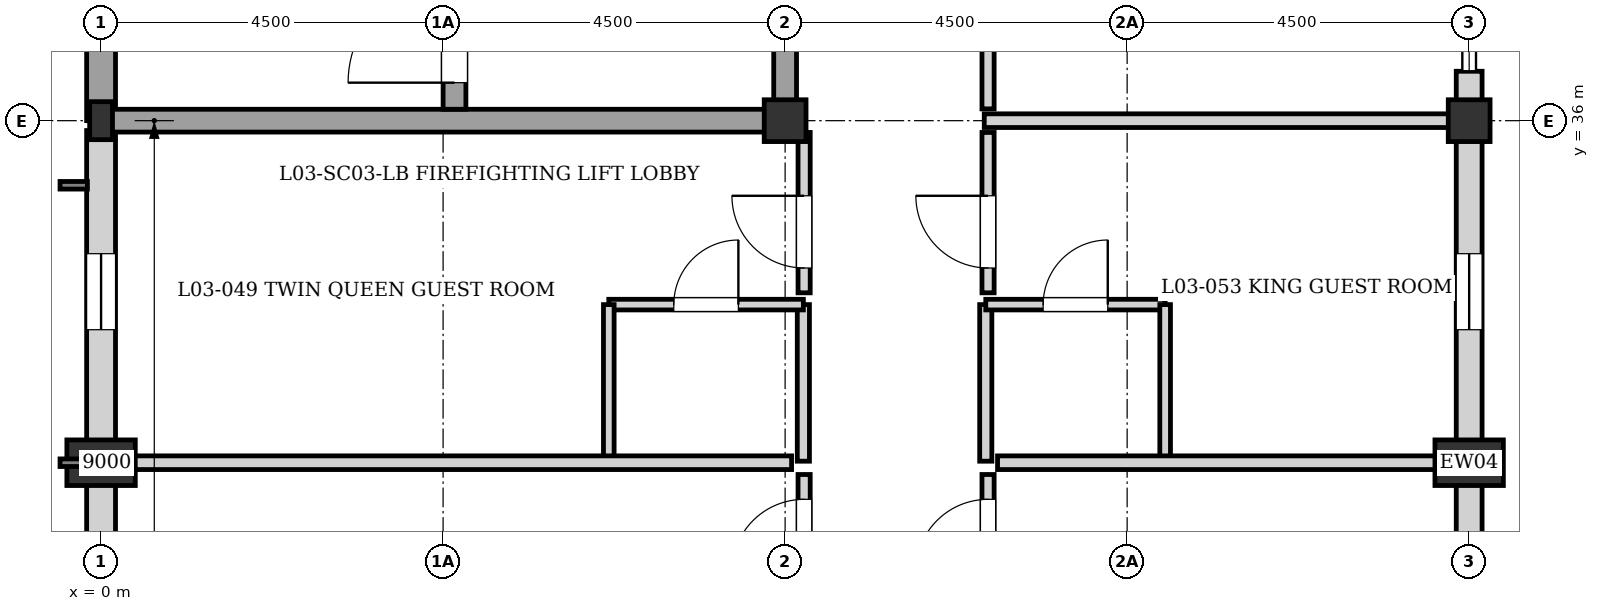
"""IFC4 building model, lengths in metres.
Left out: names, types, materials, properties, quantities, classifications, styles, units other than length and angle.
Written with IfcOpenShell. Run it as: python <this file> out.ifc"""

import sys

from ifc_helpers import new_model, si_unit, direction, frame, frame_2d, origin, origin_2d, place, context, subcontext, project, spatial, rectangle, i_section, extrude, element, fill, save


model = new_model("IFC4")
c1 = context("Model", 3, precision=1e-05, world=origin(), true_north=direction((0.0, 1.0)))
c2 = subcontext(c1, "Body", "Model", "MODEL_VIEW")
j1 = project(units=[si_unit("LENGTHUNIT", "METRE"), si_unit("PLANEANGLEUNIT", "RADIAN")], contexts=[c1])
p1 = place(None, origin())
s1 = spatial("IfcSite", under=j1, at=p1, CompositionType="ELEMENT")
p2 = place(p1, origin())
s2 = spatial("IfcBuilding", under=s1, at=p2, CompositionType="ELEMENT")
p3 = place(p2, frame((0.0, 0.0, 11.52)))
s3 = spatial("IfcBuildingStorey", under=s2, at=p3, CompositionType="ELEMENT", Elevation=11.52)
p4 = place(p3, frame((0.0, 36.0, 0.0), z_axis=(0.0, 0.0, 1.0), x_axis=(1.0, 0.0, 0.0)))
e1 = element("IfcColumn", 1, at=p4, inside=s3, PredefinedType="COLUMN", context=c2, shape_type="SweptSolid", body=[
    extrude(i_section(OverallWidth=0.3, OverallDepth=0.5, WebThickness=0.014, FlangeThickness=0.028, at=origin_2d()), origin(), (0.0, 0.0, 1.0), 3.04),
])
for number, where, z_axis, x_axis in (
    (2, (9.0, 36.0, 0.0), (0.0, 0.0, 1.0), (1.0, 0.0, 0.0)),
    (3, (18.0, 36.0, 0.0), (0.0, 0.0, 1.0), (1.0, 0.0, 0.0)),
):
    element("IfcColumn", number, at=place(p3, frame(where, z_axis=z_axis, x_axis=x_axis)), inside=s3, PredefinedType="COLUMN", context=c2, shape_type="SweptSolid", body=[
        extrude(rectangle(XDim=0.55, YDim=0.55, at=origin_2d()), origin(), (0.0, 0.0, 1.0), 3.04),
    ])
for number, where, z_axis, x_axis in (
    (4, (0.0, 31.5, 0.0), (0.0, 0.0, 1.0), (0.0, 1.0, 0.0)),
    (5, (18.0, 31.5, 0.0), (0.0, 0.0, 1.0), (0.0, 1.0, 0.0)),
):
    element("IfcColumn", number, at=place(p3, frame(where, z_axis=z_axis, x_axis=x_axis)), inside=s3, PredefinedType="PILASTER", context=c2, shape_type="SweptSolid", body=[
        extrude(rectangle(XDim=0.6, YDim=0.9, at=origin_2d()), origin(), (0.0, 0.0, 1.0), 3.04),
    ])
p5 = place(p3, frame((0.0, 27.0, 0.0), z_axis=(0.0, 0.0, 1.0), x_axis=(0.0, 1.0, 0.0)))
e6 = element("IfcWall", 6, at=p5, inside=s3, PredefinedType="SOLIDWALL", context=c2, shape_type="SweptSolid", body=[
    extrude(rectangle(XDim=8.87, YDim=0.38, at=frame_2d((4.435, 0.0))), origin(), (0.0, 0.0, 1.0), 2.48),
])
p6 = place(p5, frame((1.75, 0.0, 0.35)))
e7 = element("IfcOpeningElement", 7, at=p6, cuts=e6, PredefinedType="OPENING", context=c2, shape_type="SweptSolid", body=[
    extrude(rectangle(XDim=1.0, YDim=1.6, at=frame_2d((0.5, 0.8))), frame((0.0, 0.2, 0.0), z_axis=(0.0, -1.0, 0.0), x_axis=(1.0, 0.0, 0.0)), (0.0, 0.0, 1.0), 0.4),
])
p7 = place(p5, frame((6.25, 0.0, 0.35)))
e8 = element("IfcOpeningElement", 8, at=p7, cuts=e6, PredefinedType="OPENING", context=c2, shape_type="SweptSolid", body=[
    extrude(rectangle(XDim=1.0, YDim=1.6, at=frame_2d((0.5, 0.8))), frame((0.0, 0.2, 0.0), z_axis=(0.0, -1.0, 0.0), x_axis=(1.0, 0.0, 0.0)), (0.0, 0.0, 1.0), 0.4),
])
p8 = place(p3, frame((0.0, 36.0, 0.0), z_axis=(0.0, 0.0, 1.0), x_axis=(0.0, 1.0, 0.0)))
e9 = element("IfcWall", 9, at=p8, inside=s3, PredefinedType="SOLIDWALL", context=c2, shape_type="SweptSolid", body=[
    extrude(rectangle(XDim=9.0, YDim=0.38, at=frame_2d((4.5, 0.0))), origin(), (0.0, 0.0, 1.0), 2.82),
])
p9 = place(p3, frame((18.0, 36.65, 0.0), z_axis=(0.0, 0.0, 1.0), x_axis=(0.0, -1.0, 0.0)))
e10 = element("IfcWall", 10, at=p9, inside=s3, PredefinedType="SOLIDWALL", context=c2, shape_type="SweptSolid", body=[
    extrude(rectangle(XDim=0.65, YDim=0.34, at=frame_2d((0.325, 0.0))), origin(), (0.0, 0.0, 1.0), 2.42),
])
p10 = place(p3, frame((18.0, 36.0, 0.0), z_axis=(0.0, 0.0, 1.0), x_axis=(0.0, -1.0, 0.0)))
e11 = element("IfcWall", 11, at=p10, inside=s3, PredefinedType="SOLIDWALL", context=c2, shape_type="SweptSolid", body=[
    extrude(rectangle(XDim=9.0, YDim=0.34, at=frame_2d((4.5, 0.0))), origin(), (0.0, 0.0, 1.0), 2.48),
])
p11 = place(p10, frame((1.75, 0.0, 0.35)))
e12 = element("IfcOpeningElement", 12, at=p11, cuts=e11, PredefinedType="OPENING", context=c2, shape_type="SweptSolid", body=[
    extrude(rectangle(XDim=1.0, YDim=1.6, at=frame_2d((0.5, 0.8))), frame((0.0, 0.18, 0.0), z_axis=(0.0, -1.0, 0.0), x_axis=(1.0, 0.0, 0.0)), (0.0, 0.0, 1.0), 0.36),
])
p12 = place(p10, frame((6.25, 0.0, 0.35)))
e13 = element("IfcOpeningElement", 13, at=p12, cuts=e11, PredefinedType="OPENING", context=c2, shape_type="SweptSolid", body=[
    extrude(rectangle(XDim=1.0, YDim=1.6, at=frame_2d((0.5, 0.8))), frame((0.0, 0.18, 0.0), z_axis=(0.0, -1.0, 0.0), x_axis=(1.0, 0.0, 0.0)), (0.0, 0.0, 1.0), 0.36),
])
p13 = place(p3, frame((0.0, 36.0, 0.0), z_axis=(0.0, 0.0, 1.0), x_axis=(1.0, 0.0, 0.0)))
e14 = element("IfcWall", 14, at=p13, inside=s3, PredefinedType="SHEAR", context=c2, shape_type="SweptSolid", body=[
    extrude(rectangle(XDim=9.0, YDim=0.3, at=frame_2d((4.5, 0.0))), origin(), (0.0, 0.0, 1.0), 2.82),
])
p14 = place(p3, frame((9.0, 36.0, 0.0), z_axis=(0.0, 0.0, 1.0), x_axis=(0.0, 1.0, 0.0)))
e15 = element("IfcWall", 15, at=p14, inside=s3, PredefinedType="SHEAR", context=c2, shape_type="SweptSolid", body=[
    extrude(rectangle(XDim=9.0, YDim=0.3, at=frame_2d((4.5, 0.0))), origin(), (0.0, 0.0, 1.0), 2.82),
])
p15 = place(p14, frame((2.05, 0.0, 0.0)))
e16 = element("IfcOpeningElement", 16, at=p15, cuts=e15, PredefinedType="OPENING", context=c2, shape_type="SweptSolid", body=[
    extrude(rectangle(XDim=1.4, YDim=2.02, at=frame_2d((0.7, 1.01))), frame((0.0, 0.16, 0.0), z_axis=(0.0, -1.0, 0.0), x_axis=(1.0, 0.0, 0.0)), (0.0, 0.0, 1.0), 0.32),
])
p16 = place(p3, frame((4.65, 36.15, 0.0), z_axis=(0.0, 0.0, 1.0), x_axis=(0.0, 1.0, 0.0)))
e17 = element("IfcWall", 17, at=p16, inside=s3, PredefinedType="SHEAR", context=c2, shape_type="SweptSolid", body=[
    extrude(rectangle(XDim=8.7, YDim=0.3, at=frame_2d((4.35, 0.0))), origin(), (0.0, 0.0, 1.0), 2.82),
])
p17 = place(p16, frame((0.35, 0.0, 0.0)))
e18 = element("IfcOpeningElement", 18, at=p17, cuts=e17, PredefinedType="OPENING", context=c2, shape_type="SweptSolid", body=[
    extrude(rectangle(XDim=1.4, YDim=2.02, at=frame_2d((0.7, 1.01))), frame((0.0, 0.16, 0.0), z_axis=(0.0, -1.0, 0.0), x_axis=(1.0, 0.0, 0.0)), (0.0, 0.0, 1.0), 0.32),
])
p18 = place(p3, frame((9.24, 31.52, 0.0), z_axis=(0.0, 0.0, 1.0), x_axis=(0.0, 1.0, 0.0)))
e19 = element("IfcWall", 19, at=p18, inside=s3, PredefinedType="PARTITIONING", context=c2, shape_type="SweptSolid", body=[
    extrude(rectangle(XDim=2.06, YDim=0.16, at=frame_2d((1.03, 0.0))), origin(), (0.0, 0.0, 1.0), 2.82),
])
p19 = place(p3, frame((6.68, 33.58, 0.0), z_axis=(0.0, 0.0, 1.0), x_axis=(1.0, 0.0, 0.0)))
e20 = element("IfcWall", 20, at=p19, inside=s3, PredefinedType="PLUMBINGWALL", context=c2, shape_type="SweptSolid", body=[
    extrude(rectangle(XDim=2.56, YDim=0.14, at=frame_2d((1.28, 0.0))), origin(), (0.0, 0.0, 1.0), 2.82),
])
p20 = place(p19, frame((0.855, 0.0, 0.0)))
e21 = element("IfcOpeningElement", 21, at=p20, cuts=e20, PredefinedType="OPENING", context=c2, shape_type="SweptSolid", body=[
    extrude(rectangle(XDim=0.85, YDim=2.04, at=frame_2d((0.425, 1.02))), frame((0.0, 0.08, 0.0), z_axis=(0.0, -1.0, 0.0), x_axis=(1.0, 0.0, 0.0)), (0.0, 0.0, 1.0), 0.16),
])
p21 = place(p3, frame((6.68, 31.52, 0.0), z_axis=(0.0, 0.0, 1.0), x_axis=(0.0, 1.0, 0.0)))
e22 = element("IfcWall", 22, at=p21, inside=s3, PredefinedType="PLUMBINGWALL", context=c2, shape_type="SweptSolid", body=[
    extrude(rectangle(XDim=2.06, YDim=0.14, at=frame_2d((1.03, 0.0))), origin(), (0.0, 0.0, 1.0), 2.82),
])
p22 = place(p3, frame((11.64, 31.52, 0.0), z_axis=(0.0, 0.0, 1.0), x_axis=(0.0, 1.0, 0.0)))
e23 = element("IfcWall", 23, at=p22, inside=s3, PredefinedType="PARTITIONING", context=c2, shape_type="SweptSolid", body=[
    extrude(rectangle(XDim=2.06, YDim=0.16, at=frame_2d((1.03, 0.0))), origin(), (0.0, 0.0, 1.0), 2.82),
])
p23 = place(p3, frame((11.64, 33.58, 0.0), z_axis=(0.0, 0.0, 1.0), x_axis=(1.0, 0.0, 0.0)))
e24 = element("IfcWall", 24, at=p23, inside=s3, PredefinedType="PLUMBINGWALL", context=c2, shape_type="SweptSolid", body=[
    extrude(rectangle(XDim=2.36, YDim=0.14, at=frame_2d((1.18, 0.0))), origin(), (0.0, 0.0, 1.0), 2.82),
])
p24 = place(p23, frame((0.755, 0.0, 0.0)))
e25 = element("IfcOpeningElement", 25, at=p24, cuts=e24, PredefinedType="OPENING", context=c2, shape_type="SweptSolid", body=[
    extrude(rectangle(XDim=0.85, YDim=2.04, at=frame_2d((0.425, 1.02))), frame((0.0, 0.08, 0.0), z_axis=(0.0, -1.0, 0.0), x_axis=(1.0, 0.0, 0.0)), (0.0, 0.0, 1.0), 0.16),
])
p25 = place(p3, frame((14.0, 31.52, 0.0), z_axis=(0.0, 0.0, 1.0), x_axis=(0.0, 1.0, 0.0)))
e26 = element("IfcWall", 26, at=p25, inside=s3, PredefinedType="PLUMBINGWALL", context=c2, shape_type="SweptSolid", body=[
    extrude(rectangle(XDim=2.06, YDim=0.14, at=frame_2d((1.03, 0.0))), origin(), (0.0, 0.0, 1.0), 2.82),
])
p26 = place(p3, frame((0.195, 31.5, 0.0), z_axis=(0.0, 0.0, 1.0), x_axis=(1.0, 0.0, 0.0)))
e27 = element("IfcWall", 27, at=p26, inside=s3, PredefinedType="PARTITIONING", context=c2, shape_type="SweptSolid", body=[
    extrude(rectangle(XDim=8.89, YDim=0.18, at=frame_2d((4.445, 0.0))), origin(), (0.0, 0.0, 1.0), 2.82),
])
p27 = place(p3, frame((11.795, 31.5, 0.0), z_axis=(0.0, 0.0, 1.0), x_axis=(1.0, 0.0, 0.0)))
e28 = element("IfcWall", 28, at=p27, inside=s3, PredefinedType="PARTITIONING", context=c2, shape_type="SweptSolid", body=[
    extrude(rectangle(XDim=6.03, YDim=0.18, at=frame_2d((3.015, 0.0))), origin(), (0.0, 0.0, 1.0), 2.82),
])
p28 = place(p3, frame((11.62, 36.0, 0.0), z_axis=(0.0, 0.0, 1.0), x_axis=(1.0, 0.0, 0.0)))
e29 = element("IfcWall", 29, at=p28, inside=s3, PredefinedType="PARTITIONING", context=c2, shape_type="SweptSolid", body=[
    extrude(rectangle(XDim=6.205, YDim=0.18, at=frame_2d((3.103, 0.0))), origin(), (0.0, 0.0, 1.0), 2.34),
])
p29 = place(p3, frame((9.25, 29.235, 0.0), z_axis=(0.0, 0.0, 1.0), x_axis=(0.0, 1.0, 0.0)))
e30 = element("IfcWall", 30, at=p29, inside=s3, PredefinedType="PARTITIONING", context=c2, shape_type="SweptSolid", body=[
    extrude(rectangle(XDim=2.11, YDim=0.16, at=frame_2d((1.055, 0.0))), origin(), (0.0, 0.0, 1.0), 2.82),
])
p30 = place(p29, frame((0.833, 0.0, 0.0)))
e31 = element("IfcOpeningElement", 31, at=p30, cuts=e30, PredefinedType="OPENING", context=c2, shape_type="SweptSolid", body=[
    extrude(rectangle(XDim=0.95, YDim=2.15, at=frame_2d((0.475, 1.075))), frame((0.0, 0.09, 0.0), z_axis=(0.0, -1.0, 0.0), x_axis=(1.0, 0.0, 0.0)), (0.0, 0.0, 1.0), 0.18),
])
p31 = place(p3, frame((9.25, 33.735, 0.0), z_axis=(0.0, 0.0, 1.0), x_axis=(0.0, 1.0, 0.0)))
e32 = element("IfcWall", 32, at=p31, inside=s3, PredefinedType="PARTITIONING", context=c2, shape_type="SweptSolid", body=[
    extrude(rectangle(XDim=2.11, YDim=0.16, at=frame_2d((1.055, 0.0))), origin(), (0.0, 0.0, 1.0), 2.82),
])
p32 = place(p31, frame((0.327, 0.0, 0.0)))
e33 = element("IfcOpeningElement", 33, at=p32, cuts=e32, PredefinedType="OPENING", context=c2, shape_type="SweptSolid", body=[
    extrude(rectangle(XDim=0.95, YDim=2.15, at=frame_2d((0.475, 1.075))), frame((0.0, 0.09, 0.0), z_axis=(0.0, -1.0, 0.0), x_axis=(1.0, 0.0, 0.0)), (0.0, 0.0, 1.0), 0.18),
])
p33 = place(p3, frame((11.67, 29.235, 0.0), z_axis=(0.0, 0.0, 1.0), x_axis=(0.0, 1.0, 0.0)))
e34 = element("IfcWall", 34, at=p33, inside=s3, PredefinedType="PARTITIONING", context=c2, shape_type="SweptSolid", body=[
    extrude(rectangle(XDim=2.11, YDim=0.16, at=frame_2d((1.055, 0.0))), origin(), (0.0, 0.0, 1.0), 2.82),
])
p34 = place(p33, frame((0.833, 0.0, 0.0)))
e35 = element("IfcOpeningElement", 35, at=p34, cuts=e34, PredefinedType="OPENING", context=c2, shape_type="SweptSolid", body=[
    extrude(rectangle(XDim=0.95, YDim=2.15, at=frame_2d((0.475, 1.075))), frame((0.0, 0.09, 0.0), z_axis=(0.0, -1.0, 0.0), x_axis=(1.0, 0.0, 0.0)), (0.0, 0.0, 1.0), 0.18),
])
p35 = place(p3, frame((11.67, 33.735, 0.0), z_axis=(0.0, 0.0, 1.0), x_axis=(0.0, 1.0, 0.0)))
e36 = element("IfcWall", 36, at=p35, inside=s3, PredefinedType="PARTITIONING", context=c2, shape_type="SweptSolid", body=[
    extrude(rectangle(XDim=2.11, YDim=0.16, at=frame_2d((1.055, 0.0))), origin(), (0.0, 0.0, 1.0), 2.82),
])
p36 = place(p35, frame((0.327, 0.0, 0.0)))
e37 = element("IfcOpeningElement", 37, at=p36, cuts=e36, PredefinedType="OPENING", context=c2, shape_type="SweptSolid", body=[
    extrude(rectangle(XDim=0.95, YDim=2.15, at=frame_2d((0.475, 1.075))), frame((0.0, 0.09, 0.0), z_axis=(0.0, -1.0, 0.0), x_axis=(1.0, 0.0, 0.0)), (0.0, 0.0, 1.0), 0.18),
])
p37 = place(p3, frame((11.67, 36.155, 0.0), z_axis=(0.0, 0.0, 1.0), x_axis=(0.0, 1.0, 0.0)))
e38 = element("IfcWall", 38, at=p37, inside=s3, PredefinedType="PARTITIONING", context=c2, shape_type="SweptSolid", body=[
    extrude(rectangle(XDim=4.125, YDim=0.16, at=frame_2d((2.062, 0.0))), origin(), (0.0, 0.0, 1.0), 2.82),
])
p38 = place(p37, frame((2.058, 0.0, 0.0)))
e39 = element("IfcOpeningElement", 39, at=p38, cuts=e38, PredefinedType="OPENING", context=c2, shape_type="SweptSolid", body=[
    extrude(rectangle(XDim=1.0, YDim=2.1, at=frame_2d((0.5, 1.05))), frame((0.0, 0.09, 0.0), z_axis=(0.0, -1.0, 0.0), x_axis=(1.0, 0.0, 0.0)), (0.0, 0.0, 1.0), 0.18),
])
p39 = place(p7, origin())
e40 = element("IfcWindow", 40, at=p39, inside=s3, PartitioningType="SINGLE_PANEL", PredefinedType="WINDOW", context=c2, shape_type="SweptSolid", body=[
    extrude(rectangle(XDim=1.0, YDim=1.6, at=frame_2d((0.5, 0.8))), frame((0.0, 0.03, 0.0), z_axis=(0.0, -1.0, 0.0), x_axis=(1.0, 0.0, 0.0)), (0.0, 0.0, 1.0), 0.06),
])
fill(e8, e40)
p40 = place(p11, origin())
e41 = element("IfcWindow", 41, at=p40, inside=s3, PartitioningType="SINGLE_PANEL", PredefinedType="WINDOW", context=c2, shape_type="SweptSolid", body=[
    extrude(rectangle(XDim=1.0, YDim=1.6, at=frame_2d((0.5, 0.8))), frame((0.0, 0.03, 0.0), z_axis=(0.0, -1.0, 0.0), x_axis=(1.0, 0.0, 0.0)), (0.0, 0.0, 1.0), 0.06),
])
fill(e12, e41)
p41 = place(p17, origin())
e42 = element("IfcDoor", 42, at=p41, inside=s3, OperationType="SINGLE_SWING_LEFT", PredefinedType="DOOR", context=c2, shape_type="SweptSolid", body=[
    extrude(rectangle(XDim=1.4, YDim=2.02, at=frame_2d((0.7, 1.01))), frame((0.0, 0.025, 0.0), z_axis=(0.0, -1.0, 0.0), x_axis=(1.0, 0.0, 0.0)), (0.0, 0.0, 1.0), 0.05),
])
fill(e18, e42)
p42 = place(p20, origin())
e43 = element("IfcDoor", 43, at=p42, inside=s3, OperationType="SINGLE_SWING_RIGHT", PredefinedType="DOOR", context=c2, shape_type="SweptSolid", body=[
    extrude(rectangle(XDim=0.85, YDim=2.04, at=frame_2d((0.425, 1.02))), frame((0.0, 0.025, 0.0), z_axis=(0.0, -1.0, 0.0), x_axis=(1.0, 0.0, 0.0)), (0.0, 0.0, 1.0), 0.05),
])
fill(e21, e43)
p43 = place(p24, origin())
e44 = element("IfcDoor", 44, at=p43, inside=s3, OperationType="SINGLE_SWING_RIGHT", PredefinedType="DOOR", context=c2, shape_type="SweptSolid", body=[
    extrude(rectangle(XDim=0.85, YDim=2.04, at=frame_2d((0.425, 1.02))), frame((0.0, 0.025, 0.0), z_axis=(0.0, -1.0, 0.0), x_axis=(1.0, 0.0, 0.0)), (0.0, 0.0, 1.0), 0.05),
])
fill(e25, e44)
p44 = place(p30, origin())
e45 = element("IfcDoor", 45, at=p44, inside=s3, OperationType="SINGLE_SWING_LEFT", PredefinedType="DOOR", context=c2, shape_type="SweptSolid", body=[
    extrude(rectangle(XDim=0.95, YDim=2.15, at=frame_2d((0.475, 1.075))), frame((0.0, 0.025, 0.0), z_axis=(0.0, -1.0, 0.0), x_axis=(1.0, 0.0, 0.0)), (0.0, 0.0, 1.0), 0.05),
])
fill(e31, e45)
p45 = place(p32, origin())
e46 = element("IfcDoor", 46, at=p45, inside=s3, OperationType="SINGLE_SWING_RIGHT", PredefinedType="DOOR", context=c2, shape_type="SweptSolid", body=[
    extrude(rectangle(XDim=0.95, YDim=2.15, at=frame_2d((0.475, 1.075))), frame((0.0, 0.025, 0.0), z_axis=(0.0, -1.0, 0.0), x_axis=(1.0, 0.0, 0.0)), (0.0, 0.0, 1.0), 0.05),
])
fill(e33, e46)
p46 = place(p34, origin())
e47 = element("IfcDoor", 47, at=p46, inside=s3, OperationType="SINGLE_SWING_LEFT", PredefinedType="DOOR", context=c2, shape_type="SweptSolid", body=[
    extrude(rectangle(XDim=0.95, YDim=2.15, at=frame_2d((0.475, 1.075))), frame((0.0, 0.025, 0.0), z_axis=(0.0, -1.0, 0.0), x_axis=(1.0, 0.0, 0.0)), (0.0, 0.0, 1.0), 0.05),
])
fill(e35, e47)
p47 = place(p36, origin())
e48 = element("IfcDoor", 48, at=p47, inside=s3, OperationType="SINGLE_SWING_RIGHT", PredefinedType="DOOR", context=c2, shape_type="SweptSolid", body=[
    extrude(rectangle(XDim=0.95, YDim=2.15, at=frame_2d((0.475, 1.075))), frame((0.0, 0.025, 0.0), z_axis=(0.0, -1.0, 0.0), x_axis=(1.0, 0.0, 0.0)), (0.0, 0.0, 1.0), 0.05),
])
fill(e37, e48)
save(model, sys.argv[1])
